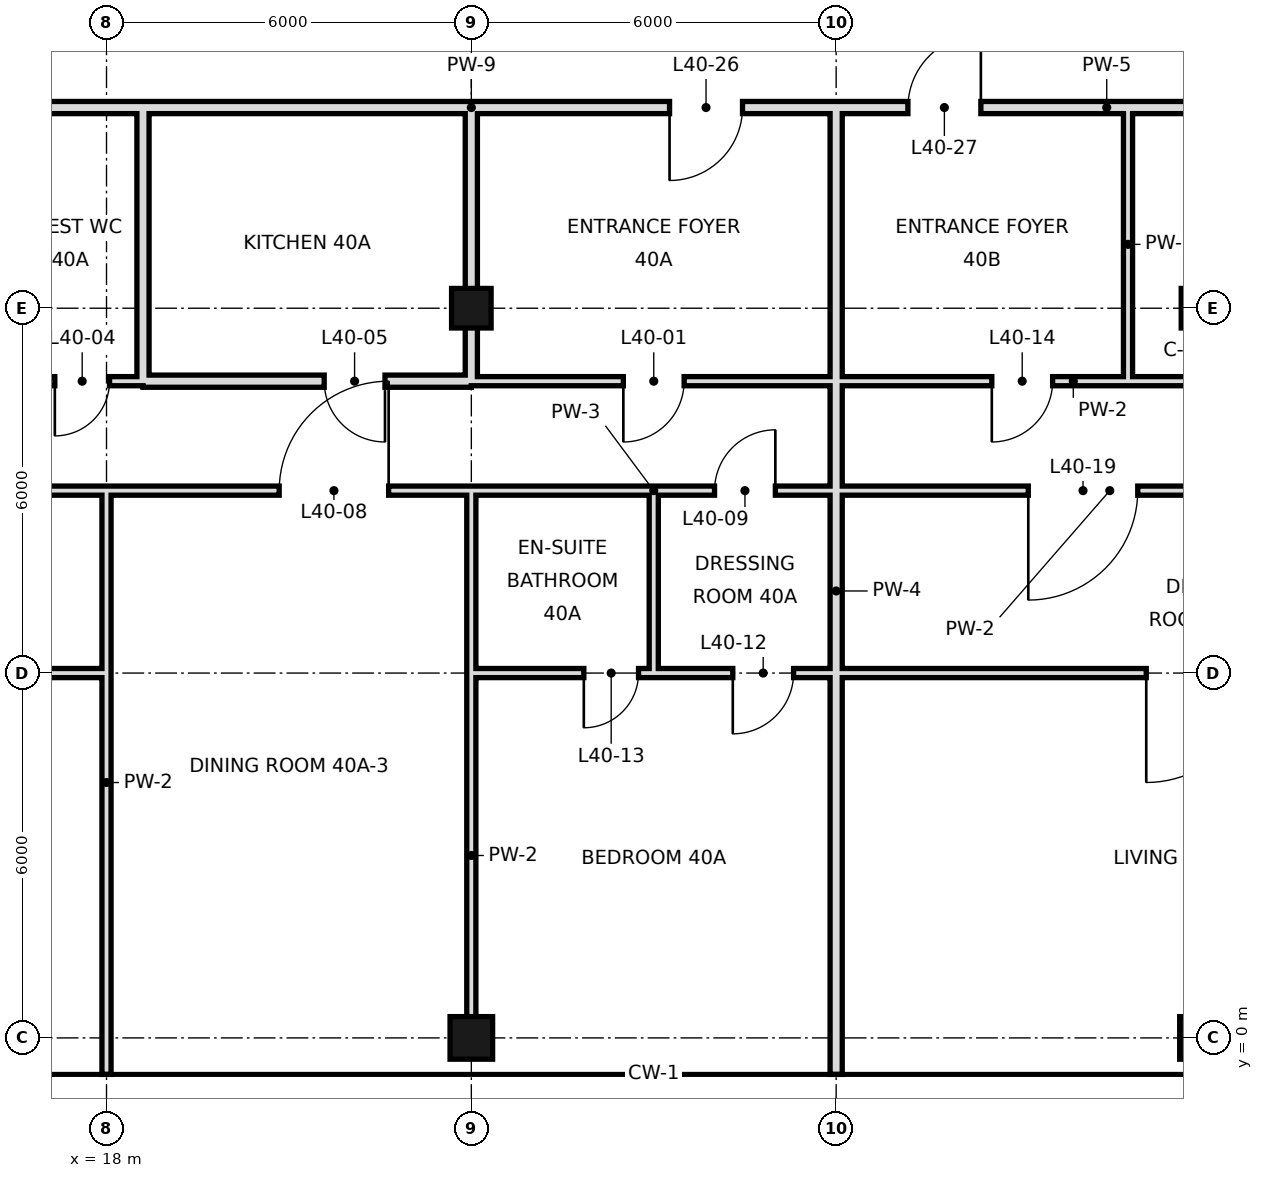
"""IFC4 building model, lengths in metres.
Left out: names, types, materials, properties, quantities, classifications, styles, units other than length and angle.
Written with IfcOpenShell. Run it as: python <this file> out.ifc"""

import sys

from ifc_helpers import new_model, si_unit, direction, frame, frame_2d, origin, origin_2d, place, context, subcontext, project, spatial, rectangle, hollow_rectangle, extrude, element, fill, save


model = new_model("IFC4")
c1 = context("Model", 3, precision=1e-05, world=origin(), true_north=direction((0.0, 1.0)))
c2 = subcontext(c1, "Body", "Model", "MODEL_VIEW")
j1 = project(units=[si_unit("LENGTHUNIT", "METRE"), si_unit("PLANEANGLEUNIT", "RADIAN")], contexts=[c1])
p1 = place(None, origin())
s1 = spatial("IfcSite", under=j1, at=p1, CompositionType="ELEMENT")
p2 = place(p1, origin())
s2 = spatial("IfcBuilding", under=s1, at=p2, CompositionType="ELEMENT")
p3 = place(p2, frame((0.0, 0.0, 174.4)))
s3 = spatial("IfcBuildingStorey", under=s2, at=p3, CompositionType="ELEMENT", Elevation=174.4)
p4 = place(p3, frame((24.0, 0.0, 0.0), z_axis=(0.0, 0.0, 1.0), x_axis=(1.0, 0.0, 0.0)))
e1 = element("IfcColumn", 1, at=p4, inside=s3, PredefinedType="COLUMN", context=c2, shape_type="SweptSolid", body=[
    extrude(hollow_rectangle(XDim=0.7, YDim=0.7, WallThickness=0.036, at=origin_2d()), origin(), (0.0, 0.0, 1.0), 3.6),
])
p5 = place(p3, frame((24.0, 12.0, 0.0), z_axis=(0.0, 0.0, 1.0), x_axis=(1.0, 0.0, 0.0)))
e2 = element("IfcColumn", 2, at=p5, inside=s3, PredefinedType="COLUMN", context=c2, shape_type="SweptSolid", body=[
    extrude(hollow_rectangle(XDim=0.65, YDim=0.65, WallThickness=0.032, at=origin_2d()), origin(), (0.0, 0.0, 1.0), 3.6),
])
p6 = place(p3, frame((36.0, 0.0, 0.0), z_axis=(0.0, 0.0, 1.0), x_axis=(1.0, 0.0, 0.0)))
e3 = element("IfcColumn", 3, at=p6, inside=s3, PredefinedType="COLUMN", context=c2, shape_type="SweptSolid", body=[
    extrude(hollow_rectangle(XDim=0.7, YDim=0.7, WallThickness=0.036, at=origin_2d()), origin(), (0.0, 0.0, 1.0), 3.6),
])
p7 = place(p3, frame((36.0, 12.0, 0.0), z_axis=(0.0, 0.0, 1.0), x_axis=(1.0, 0.0, 0.0)))
e4 = element("IfcColumn", 4, at=p7, inside=s3, PredefinedType="COLUMN", context=c2, shape_type="SweptSolid", body=[
    extrude(hollow_rectangle(XDim=0.65, YDim=0.65, WallThickness=0.032, at=origin_2d()), origin(), (0.0, 0.0, 1.0), 3.6),
])
p8 = place(p3, frame((18.0, -0.6, 0.0), z_axis=(0.0, 0.0, 1.0), x_axis=(0.0, 1.0, 0.0)))
e5 = element("IfcWall", 5, at=p8, inside=s3, PredefinedType="PARTITIONING", context=c2, shape_type="SweptSolid", body=[
    extrude(rectangle(XDim=9.6, YDim=0.15, at=frame_2d((4.8, 0.0))), origin(), (0.0, 0.0, 1.0), 2.72),
])
for number, where, z_axis, x_axis in (
    (6, (18.6, 10.8, 0.0), (0.0, 0.0, 1.0), (0.0, 1.0, 0.0)),
    (7, (24.0, 10.8, 0.0), (0.0, 0.0, 1.0), (0.0, 1.0, 0.0)),
):
    element("IfcWall", number, at=place(p3, frame(where, z_axis=z_axis, x_axis=x_axis)), inside=s3, PredefinedType="SOLIDWALL", context=c2, shape_type="SweptSolid", body=[
        extrude(rectangle(XDim=4.5, YDim=0.2, at=frame_2d((2.25, 0.0))), origin(), (0.0, 0.0, 1.0), 2.72),
    ])
p9 = place(p3, frame((24.0, 0.0, 0.0), z_axis=(0.0, 0.0, 1.0), x_axis=(0.0, 1.0, 0.0)))
e8 = element("IfcWall", 8, at=p9, inside=s3, PredefinedType="PARTITIONING", context=c2, shape_type="SweptSolid", body=[
    extrude(rectangle(XDim=6.0, YDim=0.15, at=frame_2d((3.0, 0.0))), origin(), (0.0, 0.0, 1.0), 2.72),
])
p10 = place(p3, frame((24.0, 6.0, 0.0), z_axis=(0.0, 0.0, 1.0), x_axis=(0.0, 1.0, 0.0)))
e9 = element("IfcWall", 9, at=p10, inside=s3, PredefinedType="PARTITIONING", context=c2, shape_type="SweptSolid", body=[
    extrude(rectangle(XDim=3.0, YDim=0.15, at=frame_2d((1.5, 0.0))), origin(), (0.0, 0.0, 1.0), 2.72),
])
p11 = place(p3, frame((27.0, 6.0, 0.0), z_axis=(0.0, 0.0, 1.0), x_axis=(0.0, 1.0, 0.0)))
e10 = element("IfcWall", 10, at=p11, inside=s3, PredefinedType="PARTITIONING", context=c2, shape_type="SweptSolid", body=[
    extrude(rectangle(XDim=3.0, YDim=0.15, at=frame_2d((1.5, 0.0))), origin(), (0.0, 0.0, 1.0), 3.42),
])
p12 = place(p3, frame((30.0, -0.6, 0.0), z_axis=(0.0, 0.0, 1.0), x_axis=(0.0, 1.0, 0.0)))
e11 = element("IfcWall", 11, at=p12, inside=s3, PredefinedType="SOLIDWALL", context=c2, shape_type="SweptSolid", body=[
    extrude(rectangle(XDim=15.9, YDim=0.2, at=frame_2d((7.95, 0.0))), origin(), (0.0, 0.0, 1.0), 2.72),
])
p13 = place(p3, frame((34.8, 10.8, 0.0), z_axis=(0.0, 0.0, 1.0), x_axis=(0.0, 1.0, 0.0)))
e12 = element("IfcWall", 12, at=p13, inside=s3, PredefinedType="PARTITIONING", context=c2, shape_type="SweptSolid", body=[
    extrude(rectangle(XDim=4.5, YDim=0.15, at=frame_2d((2.25, 0.0))), origin(), (0.0, 0.0, 1.0), 3.42),
])
p14 = place(p3, frame((18.6, 10.8, 0.0), z_axis=(0.0, 0.0, 1.0), x_axis=(1.0, 0.0, 0.0)))
e13 = element("IfcWall", 13, at=p14, inside=s3, PredefinedType="SOLIDWALL", context=c2, shape_type="SweptSolid", body=[
    extrude(rectangle(XDim=5.4, YDim=0.2, at=frame_2d((2.7, 0.0))), origin(), (0.0, 0.0, 1.0), 2.72),
])
p15 = place(p14, frame((2.98, 0.0, 0.0)))
e14 = element("IfcOpeningElement", 14, at=p15, cuts=e13, PredefinedType="OPENING", context=c2, shape_type="SweptSolid", body=[
    extrude(rectangle(XDim=1.0, YDim=2.4, at=frame_2d((0.5, 1.2))), frame((0.0, 0.11, 0.0), z_axis=(0.0, -1.0, 0.0), x_axis=(1.0, 0.0, 0.0)), (0.0, 0.0, 1.0), 0.22),
])
p16 = place(p3, frame((24.0, 10.8, 0.0), z_axis=(0.0, 0.0, 1.0), x_axis=(1.0, 0.0, 0.0)))
e15 = element("IfcWall", 15, at=p16, inside=s3, PredefinedType="PARTITIONING", context=c2, shape_type="SweptSolid", body=[
    extrude(rectangle(XDim=19.8, YDim=0.15, at=frame_2d((9.9, 0.0))), origin(), (0.0, 0.0, 1.0), 3.42),
])
p17 = place(p16, frame((2.5, 0.0, 0.0)))
e16 = element("IfcOpeningElement", 16, at=p17, cuts=e15, PredefinedType="OPENING", context=c2, shape_type="SweptSolid", body=[
    extrude(rectangle(XDim=1.0, YDim=2.4, at=frame_2d((0.5, 1.2))), frame((0.0, 0.085, 0.0), z_axis=(0.0, -1.0, 0.0), x_axis=(1.0, 0.0, 0.0)), (0.0, 0.0, 1.0), 0.17),
])
p18 = place(p16, frame((8.56, 0.0, 0.0)))
e17 = element("IfcOpeningElement", 17, at=p18, cuts=e15, PredefinedType="OPENING", context=c2, shape_type="SweptSolid", body=[
    extrude(rectangle(XDim=1.0, YDim=2.4, at=frame_2d((0.5, 1.2))), frame((0.0, 0.085, 0.0), z_axis=(0.0, -1.0, 0.0), x_axis=(1.0, 0.0, 0.0)), (0.0, 0.0, 1.0), 0.17),
])
p19 = place(p16, frame((16.3, 0.0, 0.0)))
e18 = element("IfcOpeningElement", 18, at=p19, cuts=e15, PredefinedType="OPENING", context=c2, shape_type="SweptSolid", body=[
    extrude(rectangle(XDim=1.0, YDim=2.4, at=frame_2d((0.5, 1.2))), frame((0.0, 0.085, 0.0), z_axis=(0.0, -1.0, 0.0), x_axis=(1.0, 0.0, 0.0)), (0.0, 0.0, 1.0), 0.17),
])
p20 = place(p3, frame((16.2, 10.8, 0.0), z_axis=(0.0, 0.0, 1.0), x_axis=(1.0, 0.0, 0.0)))
e19 = element("IfcWall", 19, at=p20, inside=s3, PredefinedType="PARTITIONING", context=c2, shape_type="SweptSolid", body=[
    extrude(rectangle(XDim=2.4, YDim=0.15, at=frame_2d((1.2, 0.0))), origin(), (0.0, 0.0, 1.0), 3.42),
])
p21 = place(p20, frame((0.95, 0.0, 0.0)))
e20 = element("IfcOpeningElement", 20, at=p21, cuts=e19, PredefinedType="OPENING", context=c2, shape_type="SweptSolid", body=[
    extrude(rectangle(XDim=0.9, YDim=2.4, at=frame_2d((0.45, 1.2))), frame((0.0, 0.085, 0.0), z_axis=(0.0, -1.0, 0.0), x_axis=(1.0, 0.0, 0.0)), (0.0, 0.0, 1.0), 0.17),
])
p22 = place(p3, frame((3.1, 15.3, 0.0), z_axis=(0.0, 0.0, 1.0), x_axis=(1.0, 0.0, 0.0)))
e21 = element("IfcWall", 21, at=p22, inside=s3, PredefinedType="SOLIDWALL", context=c2, shape_type="SweptSolid", body=[
    extrude(rectangle(XDim=15.5, YDim=0.2, at=frame_2d((7.75, 0.0))), origin(), (0.0, 0.0, 1.0), 2.72),
])
p23 = place(p3, frame((24.0, 15.3, 0.0), z_axis=(0.0, 0.0, 1.0), x_axis=(1.0, 0.0, 0.0)))
e22 = element("IfcWall", 22, at=p23, inside=s3, PredefinedType="SOLIDWALL", context=c2, shape_type="SweptSolid", body=[
    extrude(rectangle(XDim=20.9, YDim=0.2, at=frame_2d((10.45, 0.0))), origin(), (0.0, 0.0, 1.0), 2.72),
])
p24 = place(p23, frame((3.26, 0.0, 0.0)))
e23 = element("IfcOpeningElement", 23, at=p24, cuts=e22, PredefinedType="OPENING", context=c2, shape_type="SweptSolid", body=[
    extrude(rectangle(XDim=1.2, YDim=2.4, at=frame_2d((0.6, 1.2))), frame((0.0, 0.11, 0.0), z_axis=(0.0, -1.0, 0.0), x_axis=(1.0, 0.0, 0.0)), (0.0, 0.0, 1.0), 0.22),
])
p25 = place(p23, frame((7.18, 0.0, 0.0)))
e24 = element("IfcOpeningElement", 24, at=p25, cuts=e22, PredefinedType="OPENING", context=c2, shape_type="SweptSolid", body=[
    extrude(rectangle(XDim=1.2, YDim=2.4, at=frame_2d((0.6, 1.2))), frame((0.0, 0.11, 0.0), z_axis=(0.0, -1.0, 0.0), x_axis=(1.0, 0.0, 0.0)), (0.0, 0.0, 1.0), 0.22),
])
p26 = place(p3, frame((18.6, 15.3, 0.0), z_axis=(0.0, 0.0, 1.0), x_axis=(1.0, 0.0, 0.0)))
e25 = element("IfcWall", 25, at=p26, inside=s3, PredefinedType="SOLIDWALL", context=c2, shape_type="SweptSolid", body=[
    extrude(rectangle(XDim=5.4, YDim=0.2, at=frame_2d((2.7, 0.0))), origin(), (0.0, 0.0, 1.0), 3.42),
])
p27 = place(p3, frame((-6.0, 6.0, 0.0), z_axis=(0.0, 0.0, 1.0), x_axis=(1.0, 0.0, 0.0)))
e26 = element("IfcWall", 26, at=p27, inside=s3, PredefinedType="PARTITIONING", context=c2, shape_type="SweptSolid", body=[
    extrude(rectangle(XDim=24.0, YDim=0.15, at=frame_2d((12.0, 0.0))), origin(), (0.0, 0.0, 1.0), 2.97),
])
p28 = place(p27, frame((5.1, 0.0, 0.0)))
e27 = element("IfcOpeningElement", 27, at=p28, cuts=e26, PredefinedType="OPENING", context=c2, shape_type="SweptSolid", body=[
    extrude(rectangle(XDim=1.8, YDim=2.4, at=frame_2d((0.9, 1.2))), frame((0.0, 0.085, 0.0), z_axis=(0.0, -1.0, 0.0), x_axis=(1.0, 0.0, 0.0)), (0.0, 0.0, 1.0), 0.17),
])
p29 = place(p27, frame((19.04, 0.0, 0.0)))
e28 = element("IfcOpeningElement", 28, at=p29, cuts=e26, PredefinedType="OPENING", context=c2, shape_type="SweptSolid", body=[
    extrude(rectangle(XDim=1.8, YDim=2.4, at=frame_2d((0.9, 1.2))), frame((0.0, 0.085, 0.0), z_axis=(0.0, -1.0, 0.0), x_axis=(1.0, 0.0, 0.0)), (0.0, 0.0, 1.0), 0.17),
])
p30 = place(p3, frame((27.0, 6.0, 0.0), z_axis=(0.0, 0.0, 1.0), x_axis=(1.0, 0.0, 0.0)))
e29 = element("IfcWall", 29, at=p30, inside=s3, PredefinedType="PARTITIONING", context=c2, shape_type="SweptSolid", body=[
    extrude(rectangle(XDim=15.0, YDim=0.15, at=frame_2d((7.5, 0.0))), origin(), (0.0, 0.0, 1.0), 2.97),
])
p31 = place(p30, frame((1.3, 0.0, 0.0)))
e30 = element("IfcOpeningElement", 30, at=p31, cuts=e29, PredefinedType="OPENING", context=c2, shape_type="SweptSolid", body=[
    extrude(rectangle(XDim=1.0, YDim=2.4, at=frame_2d((0.5, 1.2))), frame((0.0, 0.085, 0.0), z_axis=(0.0, -1.0, 0.0), x_axis=(1.0, 0.0, 0.0)), (0.0, 0.0, 1.0), 0.17),
])
p32 = place(p30, frame((8.1, 0.0, 0.0)))
e31 = element("IfcOpeningElement", 31, at=p32, cuts=e29, PredefinedType="OPENING", context=c2, shape_type="SweptSolid", body=[
    extrude(rectangle(XDim=1.8, YDim=2.4, at=frame_2d((0.9, 1.2))), frame((0.0, 0.085, 0.0), z_axis=(0.0, -1.0, 0.0), x_axis=(1.0, 0.0, 0.0)), (0.0, 0.0, 1.0), 0.17),
])
p33 = place(p3, frame((24.0, 6.0, 0.0), z_axis=(0.0, 0.0, 1.0), x_axis=(1.0, 0.0, 0.0)))
e32 = element("IfcWall", 32, at=p33, inside=s3, PredefinedType="PARTITIONING", context=c2, shape_type="SweptSolid", body=[
    extrude(rectangle(XDim=3.0, YDim=0.15, at=frame_2d((1.5, 0.0))), origin(), (0.0, 0.0, 1.0), 2.97),
])
p34 = place(p33, frame((1.85, 0.0, 0.0)))
e33 = element("IfcOpeningElement", 33, at=p34, cuts=e32, PredefinedType="OPENING", context=c2, shape_type="SweptSolid", body=[
    extrude(rectangle(XDim=0.9, YDim=2.4, at=frame_2d((0.45, 1.2))), frame((0.0, 0.085, 0.0), z_axis=(0.0, -1.0, 0.0), x_axis=(1.0, 0.0, 0.0)), (0.0, 0.0, 1.0), 0.17),
])
p35 = place(p3, frame((-6.6, 9.0, 0.0), z_axis=(0.0, 0.0, 1.0), x_axis=(1.0, 0.0, 0.0)))
e34 = element("IfcWall", 34, at=p35, inside=s3, PredefinedType="PARTITIONING", context=c2, shape_type="SweptSolid", body=[
    extrude(rectangle(XDim=30.6, YDim=0.15, at=frame_2d((15.3, 0.0))), origin(), (0.0, 0.0, 1.0), 3.42),
])
p36 = place(p35, frame((7.64, 0.0, 0.0)))
e35 = element("IfcOpeningElement", 35, at=p36, cuts=e34, PredefinedType="OPENING", context=c2, shape_type="SweptSolid", body=[
    extrude(rectangle(XDim=1.8, YDim=2.4, at=frame_2d((0.9, 1.2))), frame((0.0, 0.085, 0.0), z_axis=(0.0, -1.0, 0.0), x_axis=(1.0, 0.0, 0.0)), (0.0, 0.0, 1.0), 0.17),
])
p37 = place(p35, frame((15.76, 0.0, 0.0)))
e36 = element("IfcOpeningElement", 36, at=p37, cuts=e34, PredefinedType="OPENING", context=c2, shape_type="SweptSolid", body=[
    extrude(rectangle(XDim=1.8, YDim=2.4, at=frame_2d((0.9, 1.2))), frame((0.0, 0.085, 0.0), z_axis=(0.0, -1.0, 0.0), x_axis=(1.0, 0.0, 0.0)), (0.0, 0.0, 1.0), 0.17),
])
p38 = place(p35, frame((27.44, 0.0, 0.0)))
e37 = element("IfcOpeningElement", 37, at=p38, cuts=e34, PredefinedType="OPENING", context=c2, shape_type="SweptSolid", body=[
    extrude(rectangle(XDim=1.8, YDim=2.4, at=frame_2d((0.9, 1.2))), frame((0.0, 0.085, 0.0), z_axis=(0.0, -1.0, 0.0), x_axis=(1.0, 0.0, 0.0)), (0.0, 0.0, 1.0), 0.17),
])
p39 = place(p3, frame((27.0, 9.0, 0.0), z_axis=(0.0, 0.0, 1.0), x_axis=(1.0, 0.0, 0.0)))
e38 = element("IfcWall", 38, at=p39, inside=s3, PredefinedType="PARTITIONING", context=c2, shape_type="SweptSolid", body=[
    extrude(rectangle(XDim=15.0, YDim=0.15, at=frame_2d((7.5, 0.0))), origin(), (0.0, 0.0, 1.0), 3.42),
])
p40 = place(p39, frame((1.0, 0.0, 0.0)))
e39 = element("IfcOpeningElement", 39, at=p40, cuts=e38, PredefinedType="OPENING", context=c2, shape_type="SweptSolid", body=[
    extrude(rectangle(XDim=1.0, YDim=2.4, at=frame_2d((0.5, 1.2))), frame((0.0, 0.085, 0.0), z_axis=(0.0, -1.0, 0.0), x_axis=(1.0, 0.0, 0.0)), (0.0, 0.0, 1.0), 0.17),
])
p41 = place(p39, frame((6.16, 0.0, 0.0)))
e40 = element("IfcOpeningElement", 40, at=p41, cuts=e38, PredefinedType="OPENING", context=c2, shape_type="SweptSolid", body=[
    extrude(rectangle(XDim=1.8, YDim=2.4, at=frame_2d((0.9, 1.2))), frame((0.0, 0.085, 0.0), z_axis=(0.0, -1.0, 0.0), x_axis=(1.0, 0.0, 0.0)), (0.0, 0.0, 1.0), 0.17),
])
p42 = place(p3, frame((24.0, 9.0, 0.0), z_axis=(0.0, 0.0, 1.0), x_axis=(1.0, 0.0, 0.0)))
e41 = element("IfcWall", 41, at=p42, inside=s3, PredefinedType="PARTITIONING", context=c2, shape_type="SweptSolid", body=[
    extrude(rectangle(XDim=3.0, YDim=0.15, at=frame_2d((1.5, 0.0))), origin(), (0.0, 0.0, 1.0), 3.42),
])
p43 = place(p17, frame((1.0, 0.0, 0.0), z_axis=(0.0, 0.0, 1.0), x_axis=(-1.0, 0.0, 0.0)))
e42 = element("IfcDoor", 42, at=p43, inside=s3, OperationType="SINGLE_SWING_RIGHT", PredefinedType="DOOR", context=c2, shape_type="SweptSolid", body=[
    extrude(rectangle(XDim=1.0, YDim=2.4, at=frame_2d((0.5, 1.2))), frame((0.0, 0.025, 0.0), z_axis=(0.0, -1.0, 0.0), x_axis=(1.0, 0.0, 0.0)), (0.0, 0.0, 1.0), 0.05),
])
fill(e16, e42)
p44 = place(p21, frame((0.9, 0.0, 0.0), z_axis=(0.0, 0.0, 1.0), x_axis=(-1.0, 0.0, 0.0)))
e43 = element("IfcDoor", 43, at=p44, inside=s3, OperationType="SINGLE_SWING_RIGHT", PredefinedType="DOOR", context=c2, shape_type="SweptSolid", body=[
    extrude(rectangle(XDim=0.9, YDim=2.4, at=frame_2d((0.45, 1.2))), frame((0.0, 0.025, 0.0), z_axis=(0.0, -1.0, 0.0), x_axis=(1.0, 0.0, 0.0)), (0.0, 0.0, 1.0), 0.05),
])
fill(e20, e43)
p45 = place(p15, origin())
e44 = element("IfcDoor", 44, at=p45, inside=s3, OperationType="SINGLE_SWING_RIGHT", PredefinedType="DOOR", context=c2, shape_type="SweptSolid", body=[
    extrude(rectangle(XDim=1.0, YDim=2.4, at=frame_2d((0.5, 1.2))), frame((0.0, 0.025, 0.0), z_axis=(0.0, -1.0, 0.0), x_axis=(1.0, 0.0, 0.0)), (0.0, 0.0, 1.0), 0.05),
])
fill(e14, e44)
p46 = place(p38, frame((1.8, 0.0, 0.0), z_axis=(0.0, 0.0, 1.0), x_axis=(-1.0, 0.0, 0.0)))
e45 = element("IfcDoor", 45, at=p46, inside=s3, OperationType="SINGLE_SWING_LEFT", PredefinedType="DOOR", context=c2, shape_type="SweptSolid", body=[
    extrude(rectangle(XDim=1.8, YDim=2.4, at=frame_2d((0.9, 1.2))), frame((0.0, 0.025, 0.0), z_axis=(0.0, -1.0, 0.0), x_axis=(1.0, 0.0, 0.0)), (0.0, 0.0, 1.0), 0.05),
])
fill(e37, e45)
p47 = place(p40, frame((1.0, 0.0, 0.0), z_axis=(0.0, 0.0, 1.0), x_axis=(-1.0, 0.0, 0.0)))
e46 = element("IfcDoor", 46, at=p47, inside=s3, OperationType="SINGLE_SWING_LEFT", PredefinedType="DOOR", context=c2, shape_type="SweptSolid", body=[
    extrude(rectangle(XDim=1.0, YDim=2.4, at=frame_2d((0.5, 1.2))), frame((0.0, 0.025, 0.0), z_axis=(0.0, -1.0, 0.0), x_axis=(1.0, 0.0, 0.0)), (0.0, 0.0, 1.0), 0.05),
])
fill(e39, e46)
p48 = place(p31, frame((1.0, 0.0, 0.0), z_axis=(0.0, 0.0, 1.0), x_axis=(-1.0, 0.0, 0.0)))
e47 = element("IfcDoor", 47, at=p48, inside=s3, OperationType="SINGLE_SWING_RIGHT", PredefinedType="DOOR", context=c2, shape_type="SweptSolid", body=[
    extrude(rectangle(XDim=1.0, YDim=2.4, at=frame_2d((0.5, 1.2))), frame((0.0, 0.025, 0.0), z_axis=(0.0, -1.0, 0.0), x_axis=(1.0, 0.0, 0.0)), (0.0, 0.0, 1.0), 0.05),
])
fill(e30, e47)
p49 = place(p34, frame((0.9, 0.0, 0.0), z_axis=(0.0, 0.0, 1.0), x_axis=(-1.0, 0.0, 0.0)))
e48 = element("IfcDoor", 48, at=p49, inside=s3, OperationType="SINGLE_SWING_RIGHT", PredefinedType="DOOR", context=c2, shape_type="SweptSolid", body=[
    extrude(rectangle(XDim=0.9, YDim=2.4, at=frame_2d((0.45, 1.2))), frame((0.0, 0.025, 0.0), z_axis=(0.0, -1.0, 0.0), x_axis=(1.0, 0.0, 0.0)), (0.0, 0.0, 1.0), 0.05),
])
fill(e33, e48)
p50 = place(p18, frame((1.0, 0.0, 0.0), z_axis=(0.0, 0.0, 1.0), x_axis=(-1.0, 0.0, 0.0)))
e49 = element("IfcDoor", 49, at=p50, inside=s3, OperationType="SINGLE_SWING_RIGHT", PredefinedType="DOOR", context=c2, shape_type="SweptSolid", body=[
    extrude(rectangle(XDim=1.0, YDim=2.4, at=frame_2d((0.5, 1.2))), frame((0.0, 0.025, 0.0), z_axis=(0.0, -1.0, 0.0), x_axis=(1.0, 0.0, 0.0)), (0.0, 0.0, 1.0), 0.05),
])
fill(e17, e49)
p51 = place(p41, frame((1.8, 0.0, 0.0), z_axis=(0.0, 0.0, 1.0), x_axis=(-1.0, 0.0, 0.0)))
e50 = element("IfcDoor", 50, at=p51, inside=s3, OperationType="SINGLE_SWING_RIGHT", PredefinedType="DOOR", context=c2, shape_type="SweptSolid", body=[
    extrude(rectangle(XDim=1.8, YDim=2.4, at=frame_2d((0.9, 1.2))), frame((0.0, 0.025, 0.0), z_axis=(0.0, -1.0, 0.0), x_axis=(1.0, 0.0, 0.0)), (0.0, 0.0, 1.0), 0.05),
])
fill(e40, e50)
p52 = place(p32, frame((1.8, 0.0, 0.0), z_axis=(0.0, 0.0, 1.0), x_axis=(-1.0, 0.0, 0.0)))
e51 = element("IfcDoor", 51, at=p52, inside=s3, OperationType="SINGLE_SWING_RIGHT", PredefinedType="DOOR", context=c2, shape_type="SweptSolid", body=[
    extrude(rectangle(XDim=1.8, YDim=2.4, at=frame_2d((0.9, 1.2))), frame((0.0, 0.025, 0.0), z_axis=(0.0, -1.0, 0.0), x_axis=(1.0, 0.0, 0.0)), (0.0, 0.0, 1.0), 0.05),
])
fill(e31, e51)
p53 = place(p24, frame((1.2, 0.0, 0.0), z_axis=(0.0, 0.0, 1.0), x_axis=(-1.0, 0.0, 0.0)))
e52 = element("IfcDoor", 52, at=p53, inside=s3, OperationType="SINGLE_SWING_RIGHT", PredefinedType="DOOR", context=c2, shape_type="SweptSolid", body=[
    extrude(rectangle(XDim=1.2, YDim=2.4, at=frame_2d((0.6, 1.2))), frame((0.0, 0.025, 0.0), z_axis=(0.0, -1.0, 0.0), x_axis=(1.0, 0.0, 0.0)), (0.0, 0.0, 1.0), 0.05),
])
fill(e23, e52)
p54 = place(p25, frame((1.2, 0.0, 0.0), z_axis=(0.0, 0.0, 1.0), x_axis=(-1.0, 0.0, 0.0)))
e53 = element("IfcDoor", 53, at=p54, inside=s3, OperationType="SINGLE_SWING_LEFT", PredefinedType="DOOR", context=c2, shape_type="SweptSolid", body=[
    extrude(rectangle(XDim=1.2, YDim=2.4, at=frame_2d((0.6, 1.2))), frame((0.0, 0.025, 0.0), z_axis=(0.0, -1.0, 0.0), x_axis=(1.0, 0.0, 0.0)), (0.0, 0.0, 1.0), 0.05),
])
fill(e24, e53)
save(model, sys.argv[1])
